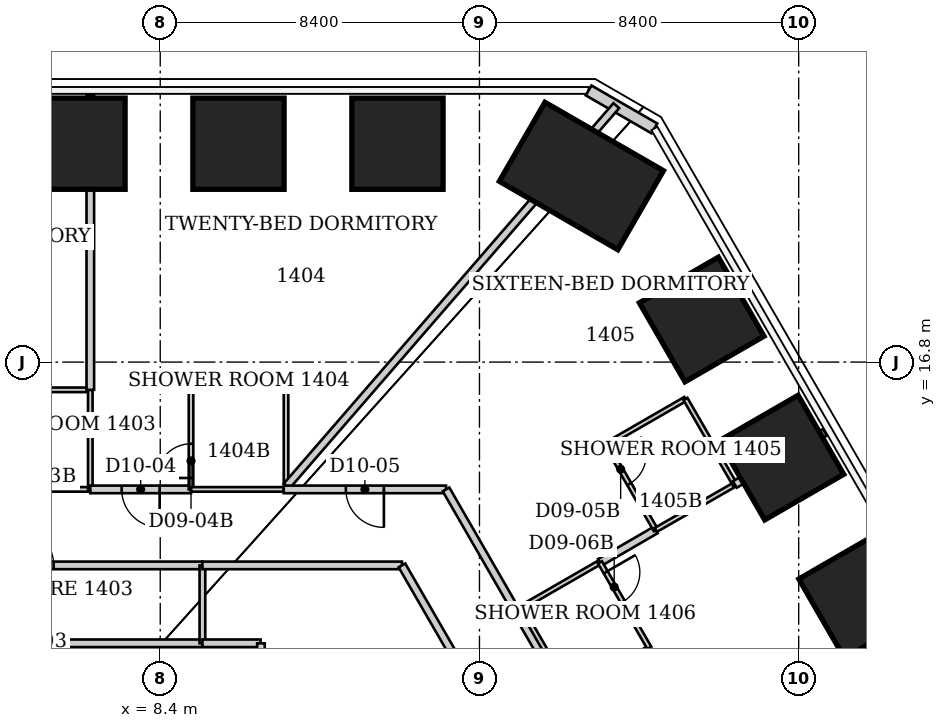
"""IFC4 building model, lengths in metres.
Left out: names, types, materials, properties, quantities, classifications, styles, units other than length and angle.
Written with IfcOpenShell. Run it as: python <this file> out.ifc"""

import sys

from ifc_helpers import new_model, si_unit, direction, frame, frame_2d, origin, origin_2d, place, context, subcontext, project, spatial, rectangle, extrude, element, fill, save


model = new_model("IFC4")
c1 = context("Model", 3, precision=1e-05, world=origin(), true_north=direction((0.0, 1.0)))
c2 = subcontext(c1, "Body", "Model", "MODEL_VIEW")
j1 = project(units=[si_unit("LENGTHUNIT", "METRE"), si_unit("PLANEANGLEUNIT", "RADIAN")], contexts=[c1])
p1 = place(None, origin())
s1 = spatial("IfcSite", under=j1, at=p1, CompositionType="ELEMENT")
p2 = place(p1, origin())
s2 = spatial("IfcBuilding", under=s1, at=p2, CompositionType="ELEMENT")
p3 = place(p2, frame((0.0, 0.0, 61.0)))
s3 = spatial("IfcBuildingStorey", under=s2, at=p3, CompositionType="ELEMENT", Elevation=61.0)
p4 = place(p3, frame((6.275, 22.547, 0.0), z_axis=(-0.010207803765, -0.036722413544, 0.999273368546), x_axis=(-0.000704593406, 0.99932545045, 0.036717129927)))
e1 = element("IfcColumn", 1, at=p4, inside=s3, PredefinedType="COLUMN", context=c2, shape_type="SweptSolid", body=[
    extrude(rectangle(XDim=2.4, YDim=2.4, at=origin_2d()), origin(), (0.0, 0.0, 1.0), 3.803),
])
p5 = place(p3, frame((10.459, 22.547, 0.0), z_axis=(-0.017011470786, -0.036654904976, 0.999183180304), x_axis=(-0.000443785294, 0.99932796694, 0.036652660843)))
e2 = element("IfcColumn", 2, at=p5, inside=s3, PredefinedType="COLUMN", context=c2, shape_type="SweptSolid", body=[
    extrude(rectangle(XDim=2.4, YDim=2.4, at=origin_2d()), origin(), (0.0, 0.0, 1.0), 3.803),
])
p6 = place(p3, frame((14.642, 22.546, 0.0), z_axis=(-0.0238126955, -0.036713913278, 0.999042063231), x_axis=(-0.001457588232, 0.999325647249, 0.036689592354)))
e3 = element("IfcColumn", 3, at=p6, inside=s3, PredefinedType="COLUMN", context=c2, shape_type="SweptSolid", body=[
    extrude(rectangle(XDim=2.4, YDim=2.4, at=origin_2d()), origin(), (0.0, 0.0, 1.0), 3.804),
])
p7 = place(p3, frame((19.482, 21.697, 0.0), z_axis=(-0.031958207844, -0.035616075007, 0.998854427909), x_axis=(0.498742821138, 0.865484661248, 0.046817726432)))
e4 = element("IfcColumn", 4, at=p7, inside=s3, PredefinedType="COLUMN", context=c2, shape_type="SweptSolid", body=[
    extrude(rectangle(XDim=2.4, YDim=3.6, at=origin_2d()), origin(), (0.0, 0.0, 1.0), 3.804),
])
p8 = place(p3, frame((22.647, 17.921, 0.0), z_axis=(-0.036388620428, -0.028815680022, 0.998922181598), x_axis=(0.865087115008, 0.499515154746, 0.045922691853)))
e5 = element("IfcColumn", 5, at=p8, inside=s3, PredefinedType="COLUMN", context=c2, shape_type="SweptSolid", body=[
    extrude(rectangle(XDim=2.4, YDim=2.4, at=origin_2d()), origin(), (0.0, 0.0, 1.0), 3.804),
])
p9 = place(p3, frame((24.746, 14.287, 0.0), z_axis=(-0.039726869437, -0.02291194247, 0.998947855865), x_axis=(0.865344046472, 0.499075645542, 0.045860454239)))
e6 = element("IfcColumn", 6, at=p9, inside=s3, PredefinedType="COLUMN", context=c2, shape_type="SweptSolid", body=[
    extrude(rectangle(XDim=2.4, YDim=2.4, at=origin_2d()), origin(), (0.0, 0.0, 1.0), 3.804),
])
p10 = place(p3, frame((26.844, 10.653, 0.0), z_axis=(-0.043127320452, -0.017071231012, 0.998923724467), x_axis=(0.865394297081, 0.498985805563, 0.045889829227)))
e7 = element("IfcColumn", 7, at=p10, inside=s3, PredefinedType="COLUMN", context=c2, shape_type="SweptSolid", body=[
    extrude(rectangle(XDim=2.4, YDim=2.4, at=origin_2d()), origin(), (0.0, 0.0, 1.0), 3.804),
])
p11 = place(p3, frame((19.672, 23.949, 0.0), z_axis=(0.0, 0.0, 1.0), x_axis=(0.866010750942, -0.50002537861, 0.0)))
e8 = element("IfcWall", 8, at=p11, inside=s3, PredefinedType="SOLIDWALL", context=c2, shape_type="SweptSolid", body=[
    extrude(rectangle(XDim=2.0, YDim=0.3, at=frame_2d((1.0, 0.0))), origin(), (0.0, 0.0, 1.0), 3.64),
])
p12 = place(p3, frame((0.58, 11.45, 0.0), z_axis=(0.0, 0.0, 1.0), x_axis=(1.0, 0.0, 0.0)))
e9 = element("IfcWall", 9, at=p12, inside=s3, PredefinedType="PARTITIONING", context=c2, shape_type="SweptSolid", body=[
    extrude(rectangle(XDim=8.93, YDim=0.2, at=frame_2d((4.465, 0.0))), origin(), (0.0, 0.0, 1.0), 3.64),
])
p13 = place(p12, frame((3.915, 0.0, 0.0)))
e10 = element("IfcOpeningElement", 10, at=p13, cuts=e9, PredefinedType="OPENING", context=c2, shape_type="SweptSolid", body=[
    extrude(rectangle(XDim=1.1, YDim=2.2, at=frame_2d((0.55, 1.1))), frame((0.0, 0.1, 0.0), z_axis=(0.0, -1.0, 0.0), x_axis=(1.0, 0.0, 0.0)), (0.0, 0.0, 1.0), 0.2),
])
for number, where, z_axis, x_axis in (
    (11, (6.56, 13.45, 0.0), (0.0, 0.0, 1.0), (-1.0, 0.0, 0.0)),
    (12, (6.56, 16.07, 0.0), (0.0, 0.0, 1.0), (-1.0, 0.0, 0.0)),
):
    element("IfcWall", number, at=place(p3, frame(where, z_axis=z_axis, x_axis=x_axis)), inside=s3, PredefinedType="PARTITIONING", context=c2, shape_type="SweptSolid", body=[
        extrude(rectangle(XDim=2.4, YDim=0.12, at=frame_2d((1.2, 0.0))), origin(), (0.0, 0.0, 1.0), 3.64),
    ])
p14 = place(p3, frame((6.56, 16.07, 0.0), z_axis=(0.0, 0.0, 1.0), x_axis=(0.0, -1.0, 0.0)))
e13 = element("IfcWall", 13, at=p14, inside=s3, PredefinedType="PARTITIONING", context=c2, shape_type="SweptSolid", body=[
    extrude(rectangle(XDim=2.62, YDim=0.12, at=frame_2d((1.31, 0.0))), origin(), (0.0, 0.0, 1.0), 3.64),
])
p15 = place(p3, frame((6.56, 23.83, 0.0), z_axis=(0.0, 0.0, 1.0), x_axis=(0.0, -1.0, 0.0)))
e14 = element("IfcWall", 14, at=p15, inside=s3, PredefinedType="PARTITIONING", context=c2, shape_type="SweptSolid", body=[
    extrude(rectangle(XDim=7.76, YDim=0.2, at=frame_2d((3.88, 0.0))), origin(), (0.0, 0.0, 1.0), 3.64),
])
p16 = place(p3, frame((9.21, 13.45, 0.0), z_axis=(0.0, 0.0, 1.0), x_axis=(-1.0, 0.0, 0.0)))
e15 = element("IfcWall", 15, at=p16, inside=s3, PredefinedType="PARTITIONING", context=c2, shape_type="SweptSolid", body=[
    extrude(rectangle(XDim=2.65, YDim=0.2, at=frame_2d((1.325, 0.0))), origin(), (0.0, 0.0, 1.0), 3.64),
])
p17 = place(p16, frame((0.825, 0.0, 0.0)))
e16 = element("IfcOpeningElement", 16, at=p17, cuts=e15, PredefinedType="OPENING", context=c2, shape_type="SweptSolid", body=[
    extrude(rectangle(XDim=1.0, YDim=2.13, at=frame_2d((0.5, 1.065))), frame((0.0, 0.1, 0.0), z_axis=(0.0, -1.0, 0.0), x_axis=(1.0, 0.0, 0.0)), (0.0, 0.0, 1.0), 0.2),
])
p18 = place(p3, frame((9.21, 16.12, 0.0), z_axis=(0.0, 0.0, 1.0), x_axis=(0.0, -1.0, 0.0)))
e17 = element("IfcWall", 17, at=p18, inside=s3, PredefinedType="PARTITIONING", context=c2, shape_type="SweptSolid", body=[
    extrude(rectangle(XDim=2.67, YDim=0.12, at=frame_2d((1.335, 0.0))), origin(), (0.0, 0.0, 1.0), 3.64),
])
p19 = place(p18, frame((1.47, 0.0, 0.0)))
e18 = element("IfcOpeningElement", 18, at=p19, cuts=e17, PredefinedType="OPENING", context=c2, shape_type="SweptSolid", body=[
    extrude(rectangle(XDim=0.9, YDim=2.03, at=frame_2d((0.45, 1.015))), frame((0.0, 0.06, 0.0), z_axis=(0.0, -1.0, 0.0), x_axis=(1.0, 0.0, 0.0)), (0.0, 0.0, 1.0), 0.12),
])
p20 = place(p3, frame((9.51, 9.4, 0.0), z_axis=(0.0, 0.0, 1.0), x_axis=(-1.0, 0.0, 0.0)))
e19 = element("IfcWall", 19, at=p20, inside=s3, PredefinedType="PARTITIONING", context=c2, shape_type="SweptSolid", body=[
    extrude(rectangle(XDim=8.93, YDim=0.2, at=frame_2d((4.465, 0.0))), origin(), (0.0, 0.0, 1.0), 3.64),
])
p21 = place(p3, frame((9.51, 11.45, 0.0), z_axis=(0.0, 0.0, 1.0), x_axis=(0.0, -1.0, 0.0)))
e20 = element("IfcWall", 20, at=p21, inside=s3, PredefinedType="PARTITIONING", context=c2, shape_type="SweptSolid", body=[
    extrude(rectangle(XDim=2.05, YDim=0.15, at=frame_2d((1.025, 0.0))), origin(), (0.0, 0.0, 1.0), 3.64),
])
p22 = place(p3, frame((9.51, 11.45, 0.0), z_axis=(0.0, 0.0, 1.0), x_axis=(1.0, 0.0, 0.0)))
e21 = element("IfcWall", 21, at=p22, inside=s3, PredefinedType="PARTITIONING", context=c2, shape_type="SweptSolid", body=[
    extrude(rectangle(XDim=5.25, YDim=0.2, at=frame_2d((2.625, 0.0))), origin(), (0.0, 0.0, 1.0), 3.64),
])
p23 = place(p3, frame((11.04, 9.4, 0.0), z_axis=(0.0, 0.0, 1.0), x_axis=(-1.0, 0.0, 0.0)))
e22 = element("IfcWall", 22, at=p23, inside=s3, PredefinedType="PARTITIONING", context=c2, shape_type="SweptSolid", body=[
    extrude(rectangle(XDim=1.53, YDim=0.2, at=frame_2d((0.765, 0.0))), origin(), (0.0, 0.0, 1.0), 3.64),
])
p24 = place(p3, frame((11.05, -7.76, 0.0), z_axis=(0.0, 0.0, 1.0), x_axis=(0.0, 1.0, 0.0)))
e23 = element("IfcWall", 23, at=p24, inside=s3, PredefinedType="PARTITIONING", context=c2, shape_type="SweptSolid", body=[
    extrude(rectangle(XDim=17.16, YDim=0.2, at=frame_2d((8.58, 0.0))), origin(), (0.0, 0.0, 1.0), 3.64),
])
p25 = place(p24, frame((8.03, 0.0, 0.0)))
e24 = element("IfcOpeningElement", 24, at=p25, cuts=e23, PredefinedType="OPENING", context=c2, shape_type="SweptSolid", body=[
    extrude(rectangle(XDim=1.1, YDim=2.2, at=frame_2d((0.55, 1.1))), frame((0.0, 0.1, 0.0), z_axis=(0.0, -1.0, 0.0), x_axis=(1.0, 0.0, 0.0)), (0.0, 0.0, 1.0), 0.2),
])
p26 = place(p3, frame((11.65, 13.45, 0.0), z_axis=(0.0, 0.0, 1.0), x_axis=(-1.0, 0.0, 0.0)))
e25 = element("IfcWall", 25, at=p26, inside=s3, PredefinedType="PARTITIONING", context=c2, shape_type="SweptSolid", body=[
    extrude(rectangle(XDim=2.44, YDim=0.12, at=frame_2d((1.22, 0.0))), origin(), (0.0, 0.0, 1.0), 3.64),
])
p27 = place(p3, frame((11.71, 13.605, 0.0), z_axis=(0.0, 0.0, 1.0), x_axis=(0.0, 1.0, 0.0)))
e26 = element("IfcWall", 26, at=p27, inside=s3, PredefinedType="PARTITIONING", context=c2, shape_type="SweptSolid", body=[
    extrude(rectangle(XDim=2.515, YDim=0.12, at=frame_2d((1.258, 0.0))), origin(), (0.0, 0.0, 1.0), 3.64),
])
p28 = place(p3, frame((11.71, 16.12, 0.0), z_axis=(0.0, 0.0, 1.0), x_axis=(-1.0, 0.0, 0.0)))
e27 = element("IfcWall", 27, at=p28, inside=s3, PredefinedType="PARTITIONING", context=c2, shape_type="SweptSolid", body=[
    extrude(rectangle(XDim=2.5, YDim=0.12, at=frame_2d((1.25, 0.0))), origin(), (0.0, 0.0, 1.0), 3.64),
])
p29 = place(p3, frame((11.725, 13.537, 0.0), z_axis=(0.0, 0.0, 1.0), x_axis=(0.654910189761, 0.755706717813, 0.0)))
e28 = element("IfcWall", 28, at=p29, inside=s3, PredefinedType="PARTITIONING", context=c2, shape_type="SweptSolid", body=[
    extrude(rectangle(XDim=13.247, YDim=0.2, at=frame_2d((6.623, 0.0))), origin(), (0.0, 0.0, 1.0), 3.64),
])
p30 = place(p3, frame((14.76, 11.45, 0.0), z_axis=(0.0, 0.0, 1.0), x_axis=(0.500074726567, -0.865982256082, 0.0)))
e29 = element("IfcWall", 29, at=p30, inside=s3, PredefinedType="PARTITIONING", context=c2, shape_type="SweptSolid", body=[
    extrude(rectangle(XDim=7.379, YDim=0.2, at=frame_2d((3.689, 0.0))), origin(), (0.0, 0.0, 1.0), 3.64),
])
p31 = place(p3, frame((15.92, 13.45, 0.0), z_axis=(0.0, 0.0, 1.0), x_axis=(-1.0, 0.0, 0.0)))
e30 = element("IfcWall", 30, at=p31, inside=s3, PredefinedType="PARTITIONING", context=c2, shape_type="SweptSolid", body=[
    extrude(rectangle(XDim=4.27, YDim=0.2, at=frame_2d((2.135, 0.0))), origin(), (0.0, 0.0, 1.0), 3.64),
])
p32 = place(p31, frame((1.635, 0.0, 0.0)))
e31 = element("IfcOpeningElement", 31, at=p32, cuts=e30, PredefinedType="OPENING", context=c2, shape_type="SweptSolid", body=[
    extrude(rectangle(XDim=1.0, YDim=2.13, at=frame_2d((0.5, 1.065))), frame((0.0, 0.1, 0.0), z_axis=(0.0, -1.0, 0.0), x_axis=(1.0, 0.0, 0.0)), (0.0, 0.0, 1.0), 0.2),
])
p33 = place(p3, frame((15.92, 13.45, 0.0), z_axis=(0.0, 0.0, 1.0), x_axis=(0.499668886391, -0.866216487937, 0.0)))
e32 = element("IfcWall", 32, at=p33, inside=s3, PredefinedType="PARTITIONING", context=c2, shape_type="SweptSolid", body=[
    extrude(rectangle(XDim=3.683, YDim=0.2, at=frame_2d((1.841, 0.0))), origin(), (0.0, 0.0, 1.0), 3.64),
])
p34 = place(p3, frame((17.76, 10.26, 0.0), z_axis=(0.0, 0.0, 1.0), x_axis=(0.499725974117, -0.866183554908, 0.0)))
e33 = element("IfcWall", 33, at=p34, inside=s3, PredefinedType="PARTITIONING", context=c2, shape_type="SweptSolid", body=[
    extrude(rectangle(XDim=6.003, YDim=0.2, at=frame_2d((3.001, 0.0))), origin(), (0.0, 0.0, 1.0), 3.64),
])
p35 = place(p34, frame((2.75, 0.0, 0.0)))
e34 = element("IfcOpeningElement", 34, at=p35, cuts=e33, PredefinedType="OPENING", context=c2, shape_type="SweptSolid", body=[
    extrude(rectangle(XDim=1.0, YDim=2.13, at=frame_2d((0.5, 1.065))), frame((0.0, 0.1, 0.0), z_axis=(0.0, -1.0, 0.0), x_axis=(1.0, 0.0, 0.0)), (0.0, 0.0, 1.0), 0.2),
])
p36 = place(p3, frame((17.773, 10.268, 0.0), z_axis=(0.0, 0.0, 1.0), x_axis=(0.867562218799, 0.497328660458, 0.0)))
e35 = element("IfcWall", 35, at=p36, inside=s3, PredefinedType="PARTITIONING", context=c2, shape_type="SweptSolid", body=[
    extrude(rectangle(XDim=0.133, YDim=0.2, at=frame_2d((0.066, 0.0))), origin(), (0.0, 0.0, 1.0), 3.64),
])
p37 = place(p3, frame((17.888, 10.333, 0.0), z_axis=(0.0, 0.0, 1.0), x_axis=(0.866473201492, 0.499223588281, 0.0)))
e36 = element("IfcWall", 36, at=p37, inside=s3, PredefinedType="PARTITIONING", context=c2, shape_type="SweptSolid", body=[
    extrude(rectangle(XDim=2.401, YDim=0.12, at=frame_2d((1.201, 0.0))), origin(), (0.0, 0.0, 1.0), 2.86),
])
p38 = place(p3, frame((17.89, 10.33, 0.0), z_axis=(0.0, 0.0, 1.0), x_axis=(0.500291685314, -0.865856933682, 0.0)))
e37 = element("IfcWall", 37, at=p38, inside=s3, PredefinedType="PARTITIONING", context=c2, shape_type="SweptSolid", body=[
    extrude(rectangle(XDim=2.599, YDim=0.12, at=frame_2d((1.299, 0.0))), origin(), (0.0, 0.0, 1.0), 3.64),
])
p39 = place(p3, frame((19.19, 8.08, 0.0), z_axis=(0.0, 0.0, 1.0), x_axis=(0.866202511239, 0.499693115345, 0.0)))
e38 = element("IfcWall", 38, at=p39, inside=s3, PredefinedType="PARTITIONING", context=c2, shape_type="SweptSolid", body=[
    extrude(rectangle(XDim=2.401, YDim=0.12, at=frame_2d((1.201, 0.0))), origin(), (0.0, 0.0, 1.0), 3.64),
])
p40 = place(p3, frame((19.97, 11.53, 0.0), z_axis=(0.0, 0.0, 1.0), x_axis=(0.864762765167, 0.502180604942, 0.0)))
e39 = element("IfcWall", 39, at=p40, inside=s3, PredefinedType="PARTITIONING", context=c2, shape_type="SweptSolid", body=[
    extrude(rectangle(XDim=1.698, YDim=0.2, at=frame_2d((0.849, 0.0))), origin(), (0.0, 0.0, 1.0), 2.86),
])
p41 = place(p3, frame((20.14, 14.63, 0.0), z_axis=(0.0, 0.0, 1.0), x_axis=(0.500291685314, -0.865856933682, 0.0)))
e40 = element("IfcWall", 40, at=p41, inside=s3, PredefinedType="PARTITIONING", context=c2, shape_type="SweptSolid", body=[
    extrude(rectangle(XDim=2.599, YDim=0.12, at=frame_2d((1.299, 0.0))), origin(), (0.0, 0.0, 1.0), 3.64),
])
p42 = place(p41, frame((0.3, 0.0, 0.0)))
e41 = element("IfcOpeningElement", 41, at=p42, cuts=e40, PredefinedType="OPENING", context=c2, shape_type="SweptSolid", body=[
    extrude(rectangle(XDim=0.9, YDim=2.03, at=frame_2d((0.45, 1.015))), frame((0.0, 0.06, 0.0), z_axis=(0.0, -1.0, 0.0), x_axis=(1.0, 0.0, 0.0)), (0.0, 0.0, 1.0), 0.12),
])
p43 = place(p3, frame((21.27, 9.28, 0.0), z_axis=(0.0, 0.0, 1.0), x_axis=(-0.500291685314, 0.865856933682, 0.0)))
e42 = element("IfcWall", 42, at=p43, inside=s3, PredefinedType="PARTITIONING", context=c2, shape_type="SweptSolid", body=[
    extrude(rectangle(XDim=2.599, YDim=0.12, at=frame_2d((1.299, 0.0))), origin(), (0.0, 0.0, 1.0), 3.64),
])
p44 = place(p43, frame((1.399, 0.0, 0.0)))
e43 = element("IfcOpeningElement", 43, at=p44, cuts=e42, PredefinedType="OPENING", context=c2, shape_type="SweptSolid", body=[
    extrude(rectangle(XDim=0.9, YDim=2.03, at=frame_2d((0.45, 1.015))), frame((0.0, 0.06, 0.0), z_axis=(0.0, -1.0, 0.0), x_axis=(1.0, 0.0, 0.0)), (0.0, 0.0, 1.0), 0.12),
])
p45 = place(p3, frame((21.438, 12.383, 0.0), z_axis=(0.0, 0.0, 1.0), x_axis=(0.86683819662, 0.498589551516, 0.0)))
e44 = element("IfcWall", 44, at=p45, inside=s3, PredefinedType="PARTITIONING", context=c2, shape_type="SweptSolid", body=[
    extrude(rectangle(XDim=2.401, YDim=0.12, at=frame_2d((1.201, 0.0))), origin(), (0.0, 0.0, 1.0), 2.86),
])
p46 = place(p3, frame((22.22, 15.83, 0.0), z_axis=(0.0, 0.0, 1.0), x_axis=(-0.866177122335, -0.499737123639, 0.0)))
e45 = element("IfcWall", 45, at=p46, inside=s3, PredefinedType="PARTITIONING", context=c2, shape_type="SweptSolid", body=[
    extrude(rectangle(XDim=2.401, YDim=0.12, at=frame_2d((1.201, 0.0))), origin(), (0.0, 0.0, 1.0), 3.64),
])
p47 = place(p3, frame((23.52, 13.58, 0.0), z_axis=(0.0, 0.0, 1.0), x_axis=(-0.500291685314, 0.865856933682, 0.0)))
e46 = element("IfcWall", 46, at=p47, inside=s3, PredefinedType="PARTITIONING", context=c2, shape_type="SweptSolid", body=[
    extrude(rectangle(XDim=2.599, YDim=0.12, at=frame_2d((1.299, 0.0))), origin(), (0.0, 0.0, 1.0), 3.64),
])
p48 = place(p3, frame((23.52, 13.58, 0.0), z_axis=(0.0, 0.0, 1.0), x_axis=(0.865432398871, 0.501025710902, 0.0)))
e47 = element("IfcWall", 47, at=p48, inside=s3, PredefinedType="PARTITIONING", context=c2, shape_type="SweptSolid", body=[
    extrude(rectangle(XDim=2.734, YDim=0.2, at=frame_2d((1.367, 0.0))), origin(), (0.0, 0.0, 1.0), 3.64),
])
p49 = place(p17, origin())
e48 = element("IfcDoor", 48, at=p49, inside=s3, OperationType="SINGLE_SWING_LEFT", PredefinedType="DOOR", context=c2, shape_type="SweptSolid", body=[
    extrude(rectangle(XDim=1.0, YDim=2.13, at=frame_2d((0.5, 1.065))), frame((0.0, 0.025, 0.0), z_axis=(0.0, -1.0, 0.0), x_axis=(1.0, 0.0, 0.0)), (0.0, 0.0, 1.0), 0.05),
])
fill(e16, e48)
p50 = place(p19, origin())
e49 = element("IfcDoor", 49, at=p50, inside=s3, OperationType="SINGLE_SWING_RIGHT", PredefinedType="DOOR", context=c2, shape_type="SweptSolid", body=[
    extrude(rectangle(XDim=0.9, YDim=2.03, at=frame_2d((0.45, 1.015))), frame((0.0, 0.025, 0.0), z_axis=(0.0, -1.0, 0.0), x_axis=(1.0, 0.0, 0.0)), (0.0, 0.0, 1.0), 0.05),
])
fill(e18, e49)
p51 = place(p32, origin())
e50 = element("IfcDoor", 50, at=p51, inside=s3, OperationType="SINGLE_SWING_LEFT", PredefinedType="DOOR", context=c2, shape_type="SweptSolid", body=[
    extrude(rectangle(XDim=1.0, YDim=2.13, at=frame_2d((0.5, 1.065))), frame((0.0, 0.025, 0.0), z_axis=(0.0, -1.0, 0.0), x_axis=(1.0, 0.0, 0.0)), (0.0, 0.0, 1.0), 0.05),
])
fill(e31, e50)
p52 = place(p42, origin())
e51 = element("IfcDoor", 51, at=p52, inside=s3, OperationType="SINGLE_SWING_LEFT", PredefinedType="DOOR", context=c2, shape_type="SweptSolid", body=[
    extrude(rectangle(XDim=0.9, YDim=2.03, at=frame_2d((0.45, 1.015))), frame((0.0, 0.025, 0.0), z_axis=(0.0, -1.0, 0.0), x_axis=(1.0, 0.0, 0.0)), (0.0, 0.0, 1.0), 0.05),
])
fill(e41, e51)
p53 = place(p44, origin())
e52 = element("IfcDoor", 52, at=p53, inside=s3, OperationType="SINGLE_SWING_RIGHT", PredefinedType="DOOR", context=c2, shape_type="SweptSolid", body=[
    extrude(rectangle(XDim=0.9, YDim=2.03, at=frame_2d((0.45, 1.015))), frame((0.0, 0.025, 0.0), z_axis=(0.0, -1.0, 0.0), x_axis=(1.0, 0.0, 0.0)), (0.0, 0.0, 1.0), 0.05),
])
fill(e43, e52)
p54 = place(p13, origin())
e53 = element("IfcDoor", 53, at=p54, inside=s3, OperationType="SINGLE_SWING_LEFT", PredefinedType="DOOR", context=c2, shape_type="SweptSolid", body=[
    extrude(rectangle(XDim=1.1, YDim=2.2, at=frame_2d((0.55, 1.1))), frame((0.0, 0.025, 0.0), z_axis=(0.0, -1.0, 0.0), x_axis=(1.0, 0.0, 0.0)), (0.0, 0.0, 1.0), 0.05),
])
fill(e10, e53)
save(model, sys.argv[1])
